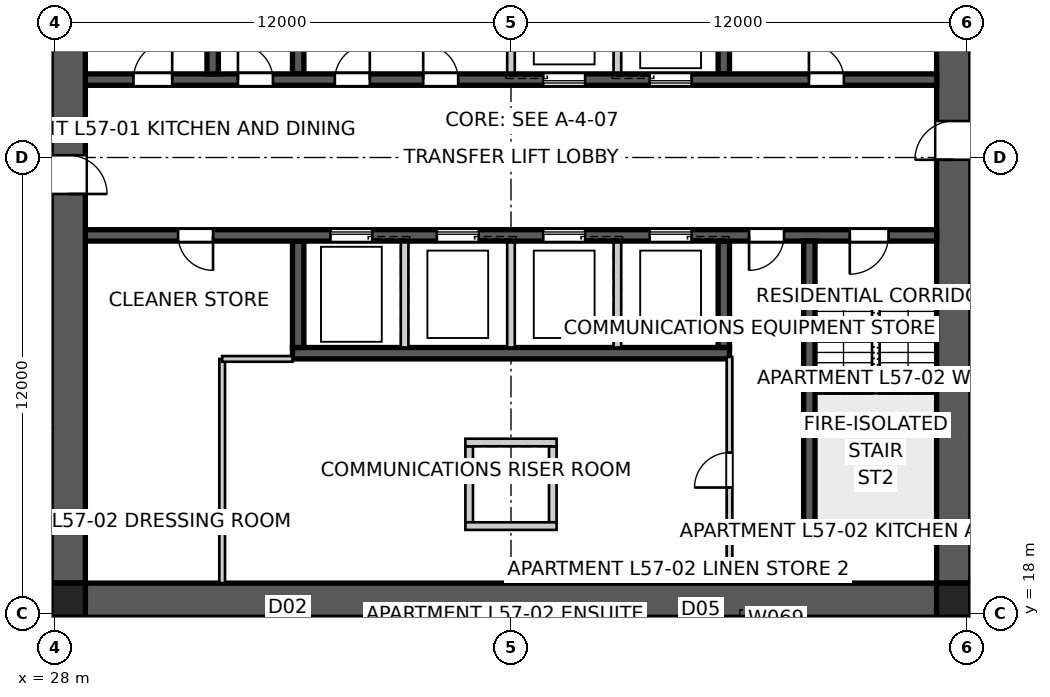
"""IFC4 building model, lengths in metres.
Left out: names, types, materials, properties, quantities, classifications, styles, units other than length and angle.
Written with IfcOpenShell. Run it as: python <this file> out.ifc"""

import sys

from ifc_helpers import new_model, si_unit, direction, frame, frame_2d, origin, origin_2d, place, context, subcontext, project, spatial, polyline, rectangle, outline, extrude, element, fill, save


model = new_model("IFC4")
c1 = context("Model", 3, precision=1e-05, world=origin(), true_north=direction((0.0, 1.0)))
c2 = subcontext(c1, "Body", "Model", "MODEL_VIEW")
j1 = project(units=[si_unit("LENGTHUNIT", "METRE"), si_unit("PLANEANGLEUNIT", "RADIAN")], contexts=[c1])
p1 = place(None, origin())
s1 = spatial("IfcSite", under=j1, at=p1, CompositionType="ELEMENT")
p2 = place(p1, origin())
s2 = spatial("IfcBuilding", under=s1, at=p2, CompositionType="ELEMENT")
p3 = place(p2, frame((0.0, 0.0, 208.2)))
s3 = spatial("IfcBuildingStorey", under=s2, at=p3, CompositionType="ELEMENT", Elevation=208.2)
p4 = place(p3, frame((51.2, 18.35, 0.0), z_axis=(0.0, 0.0, 1.0), x_axis=(-1.0, 0.0, 0.0)))
e1 = element("IfcWall", 1, at=p4, inside=s3, PredefinedType="SHEAR", context=c2, shape_type="SweptSolid", body=[
    extrude(outline(polyline([(0.0, -0.45), (22.4, -0.45), (22.4, -0.025), (22.85, -0.025), (22.85, 0.025), (22.4, 0.025), (22.4, 0.45), (0.0, 0.45), (0.0, 0.025), (-0.45, 0.025), (-0.45, -0.025), (0.0, -0.025), (0.0, -0.45)])), origin(), (0.0, 0.0, 1.0), 3.4),
])
p5 = place(p3, frame((51.65, 18.8, 0.0), z_axis=(0.0, 0.0, 1.0), x_axis=(0.0, 1.0, 0.0)))
e2 = element("IfcWall", 2, at=p5, inside=s3, PredefinedType="SHEAR", context=c2, shape_type="SweptSolid", body=[
    extrude(outline(polyline([(0.0, -0.45), (22.4, -0.45), (22.4, -0.025), (22.85, -0.025), (22.85, 0.025), (22.4, 0.025), (22.4, 0.45), (0.0, 0.45), (0.0, 0.025), (-0.45, 0.025), (-0.45, -0.025), (0.0, -0.025), (0.0, -0.45)])), origin(), (0.0, 0.0, 1.0), 3.4),
])
p6 = place(p5, frame((11.14, 0.0, 0.0)))
e3 = element("IfcOpeningElement", 3, at=p6, cuts=e2, PredefinedType="OPENING", context=c2, shape_type="SweptSolid", body=[
    extrude(rectangle(XDim=1.02, YDim=2.4, at=frame_2d((0.51, 1.2))), frame((0.0, 0.46, 0.0), z_axis=(0.0, -1.0, 0.0), x_axis=(1.0, 0.0, 0.0)), (0.0, 0.0, 1.0), 0.92),
])
p7 = place(p3, frame((28.35, 41.2, 0.0), z_axis=(0.0, 0.0, 1.0), x_axis=(0.0, -1.0, 0.0)))
e4 = element("IfcWall", 4, at=p7, inside=s3, PredefinedType="SHEAR", context=c2, shape_type="SweptSolid", body=[
    extrude(outline(polyline([(0.0, -0.45), (22.4, -0.45), (22.4, -0.025), (22.85, -0.025), (22.85, 0.025), (22.4, 0.025), (22.4, 0.45), (0.0, 0.45), (0.0, 0.025), (-0.45, 0.025), (-0.45, -0.025), (0.0, -0.025), (0.0, -0.45)])), origin(), (0.0, 0.0, 1.0), 3.4),
])
p8 = place(p7, frame((11.14, 0.0, 0.0)))
e5 = element("IfcOpeningElement", 5, at=p8, cuts=e4, PredefinedType="OPENING", context=c2, shape_type="SweptSolid", body=[
    extrude(rectangle(XDim=1.02, YDim=2.4, at=frame_2d((0.51, 1.2))), frame((0.0, 0.46, 0.0), z_axis=(0.0, -1.0, 0.0), x_axis=(1.0, 0.0, 0.0)), (0.0, 0.0, 1.0), 0.92),
])
p9 = place(p3, frame((28.8, 32.05, 0.0), z_axis=(0.0, 0.0, 1.0), x_axis=(1.0, 0.0, 0.0)))
e6 = element("IfcWall", 6, at=p9, inside=s3, PredefinedType="SHEAR", context=c2, shape_type="SweptSolid", body=[
    extrude(rectangle(XDim=22.4, YDim=0.3, at=frame_2d((11.2, 0.0))), origin(), (0.0, 0.0, 1.0), 3.4),
])
p10 = place(p9, frame((19.04, 0.0, 0.0)))
e7 = element("IfcOpeningElement", 7, at=p10, cuts=e6, PredefinedType="OPENING", context=c2, shape_type="SweptSolid", body=[
    extrude(rectangle(XDim=0.92, YDim=2.1, at=frame_2d((0.46, 1.05))), frame((0.0, 0.16, 0.0), z_axis=(0.0, -1.0, 0.0), x_axis=(1.0, 0.0, 0.0)), (0.0, 0.0, 1.0), 0.32),
])
p11 = place(p9, frame((1.265, 0.0, 0.0)))
e8 = element("IfcOpeningElement", 8, at=p11, cuts=e6, PredefinedType="OPENING", context=c2, shape_type="SweptSolid", body=[
    extrude(rectangle(XDim=1.02, YDim=2.1, at=frame_2d((0.51, 1.05))), frame((0.0, 0.16, 0.0), z_axis=(0.0, -1.0, 0.0), x_axis=(1.0, 0.0, 0.0)), (0.0, 0.0, 1.0), 0.32),
])
p12 = place(p9, frame((4.015, 0.0, 0.0)))
e9 = element("IfcOpeningElement", 9, at=p12, cuts=e6, PredefinedType="OPENING", context=c2, shape_type="SweptSolid", body=[
    extrude(rectangle(XDim=0.92, YDim=2.1, at=frame_2d((0.46, 1.05))), frame((0.0, 0.16, 0.0), z_axis=(0.0, -1.0, 0.0), x_axis=(1.0, 0.0, 0.0)), (0.0, 0.0, 1.0), 0.32),
])
p13 = place(p9, frame((6.565, 0.0, 0.0)))
e10 = element("IfcOpeningElement", 10, at=p13, cuts=e6, PredefinedType="OPENING", context=c2, shape_type="SweptSolid", body=[
    extrude(rectangle(XDim=0.92, YDim=2.1, at=frame_2d((0.46, 1.05))), frame((0.0, 0.16, 0.0), z_axis=(0.0, -1.0, 0.0), x_axis=(1.0, 0.0, 0.0)), (0.0, 0.0, 1.0), 0.32),
])
p14 = place(p9, frame((8.89, 0.0, 0.0)))
e11 = element("IfcOpeningElement", 11, at=p14, cuts=e6, PredefinedType="OPENING", context=c2, shape_type="SweptSolid", body=[
    extrude(rectangle(XDim=0.92, YDim=2.1, at=frame_2d((0.46, 1.05))), frame((0.0, 0.16, 0.0), z_axis=(0.0, -1.0, 0.0), x_axis=(1.0, 0.0, 0.0)), (0.0, 0.0, 1.0), 0.32),
])
p15 = place(p9, frame((12.05, 0.0, 0.0)))
e12 = element("IfcOpeningElement", 12, at=p15, cuts=e6, PredefinedType="OPENING", context=c2, shape_type="SweptSolid", body=[
    extrude(rectangle(XDim=1.1, YDim=2.1, at=frame_2d((0.55, 1.05))), frame((0.0, 0.16, 0.0), z_axis=(0.0, -1.0, 0.0), x_axis=(1.0, 0.0, 0.0)), (0.0, 0.0, 1.0), 0.32),
])
p16 = place(p9, frame((14.85, 0.0, 0.0)))
e13 = element("IfcOpeningElement", 13, at=p16, cuts=e6, PredefinedType="OPENING", context=c2, shape_type="SweptSolid", body=[
    extrude(rectangle(XDim=1.1, YDim=2.1, at=frame_2d((0.55, 1.05))), frame((0.0, 0.16, 0.0), z_axis=(0.0, -1.0, 0.0), x_axis=(1.0, 0.0, 0.0)), (0.0, 0.0, 1.0), 0.32),
])
p17 = place(p3, frame((51.2, 27.95, 0.0), z_axis=(0.0, 0.0, 1.0), x_axis=(-1.0, 0.0, 0.0)))
e14 = element("IfcWall", 14, at=p17, inside=s3, PredefinedType="SHEAR", context=c2, shape_type="SweptSolid", body=[
    extrude(rectangle(XDim=22.4, YDim=0.3, at=frame_2d((11.2, 0.0))), origin(), (0.0, 0.0, 1.0), 3.4),
])
p18 = place(p17, frame((19.04, 0.0, 0.0)))
e15 = element("IfcOpeningElement", 15, at=p18, cuts=e14, PredefinedType="OPENING", context=c2, shape_type="SweptSolid", body=[
    extrude(rectangle(XDim=0.92, YDim=2.1, at=frame_2d((0.46, 1.05))), frame((0.0, 0.16, 0.0), z_axis=(0.0, -1.0, 0.0), x_axis=(1.0, 0.0, 0.0)), (0.0, 0.0, 1.0), 0.32),
])
p19 = place(p17, frame((1.265, 0.0, 0.0)))
e16 = element("IfcOpeningElement", 16, at=p19, cuts=e14, PredefinedType="OPENING", context=c2, shape_type="SweptSolid", body=[
    extrude(rectangle(XDim=1.02, YDim=2.1, at=frame_2d((0.51, 1.05))), frame((0.0, 0.16, 0.0), z_axis=(0.0, -1.0, 0.0), x_axis=(1.0, 0.0, 0.0)), (0.0, 0.0, 1.0), 0.32),
])
p20 = place(p17, frame((4.015, 0.0, 0.0)))
e17 = element("IfcOpeningElement", 17, at=p20, cuts=e14, PredefinedType="OPENING", context=c2, shape_type="SweptSolid", body=[
    extrude(rectangle(XDim=0.92, YDim=2.1, at=frame_2d((0.46, 1.05))), frame((0.0, 0.16, 0.0), z_axis=(0.0, -1.0, 0.0), x_axis=(1.0, 0.0, 0.0)), (0.0, 0.0, 1.0), 0.32),
])
p21 = place(p17, frame((6.45, 0.0, 0.0)))
e18 = element("IfcOpeningElement", 18, at=p21, cuts=e14, PredefinedType="OPENING", context=c2, shape_type="SweptSolid", body=[
    extrude(rectangle(XDim=1.1, YDim=2.1, at=frame_2d((0.55, 1.05))), frame((0.0, 0.16, 0.0), z_axis=(0.0, -1.0, 0.0), x_axis=(1.0, 0.0, 0.0)), (0.0, 0.0, 1.0), 0.32),
])
p22 = place(p17, frame((9.25, 0.0, 0.0)))
e19 = element("IfcOpeningElement", 19, at=p22, cuts=e14, PredefinedType="OPENING", context=c2, shape_type="SweptSolid", body=[
    extrude(rectangle(XDim=1.1, YDim=2.1, at=frame_2d((0.55, 1.05))), frame((0.0, 0.16, 0.0), z_axis=(0.0, -1.0, 0.0), x_axis=(1.0, 0.0, 0.0)), (0.0, 0.0, 1.0), 0.32),
])
p23 = place(p17, frame((12.05, 0.0, 0.0)))
e20 = element("IfcOpeningElement", 20, at=p23, cuts=e14, PredefinedType="OPENING", context=c2, shape_type="SweptSolid", body=[
    extrude(rectangle(XDim=1.1, YDim=2.1, at=frame_2d((0.55, 1.05))), frame((0.0, 0.16, 0.0), z_axis=(0.0, -1.0, 0.0), x_axis=(1.0, 0.0, 0.0)), (0.0, 0.0, 1.0), 0.32),
])
p24 = place(p17, frame((14.85, 0.0, 0.0)))
e21 = element("IfcOpeningElement", 21, at=p24, cuts=e14, PredefinedType="OPENING", context=c2, shape_type="SweptSolid", body=[
    extrude(rectangle(XDim=1.1, YDim=2.1, at=frame_2d((0.55, 1.05))), frame((0.0, 0.16, 0.0), z_axis=(0.0, -1.0, 0.0), x_axis=(1.0, 0.0, 0.0)), (0.0, 0.0, 1.0), 0.32),
])
p25 = place(p3, frame((45.75, 24.85, 0.0), z_axis=(0.0, 0.0, 1.0), x_axis=(-1.0, 0.0, 0.0)))
e22 = element("IfcWall", 22, at=p25, inside=s3, PredefinedType="SHEAR", context=c2, shape_type="SweptSolid", body=[
    extrude(rectangle(XDim=11.5, YDim=0.3, at=frame_2d((5.75, 0.0))), origin(), (0.0, 0.0, 1.0), 3.4),
])
for number, where, z_axis, x_axis in (
    (23, (34.4, 32.2, 0.0), (0.0, 0.0, 1.0), (0.0, 1.0, 0.0)),
    (24, (45.6, 27.8, 0.0), (0.0, 0.0, 1.0), (0.0, -1.0, 0.0)),
):
    element("IfcWall", number, at=place(p3, frame(where, z_axis=z_axis, x_axis=x_axis)), inside=s3, PredefinedType="SHEAR", context=c2, shape_type="SweptSolid", body=[
        extrude(rectangle(XDim=2.8, YDim=0.3, at=frame_2d((1.4, 0.0))), origin(), (0.0, 0.0, 1.0), 3.4),
    ])
for number, where, z_axis, x_axis in (
    (25, (42.8, 27.8, 0.0), (0.0, 0.0, 1.0), (0.0, -1.0, 0.0)),
    (26, (40.0, 32.2, 0.0), (0.0, 0.0, 1.0), (0.0, 1.0, 0.0)),
    (27, (40.0, 27.8, 0.0), (0.0, 0.0, 1.0), (0.0, -1.0, 0.0)),
    (28, (42.8, 32.2, 0.0), (0.0, 0.0, 1.0), (0.0, 1.0, 0.0)),
    (29, (37.2, 27.8, 0.0), (0.0, 0.0, 1.0), (0.0, -1.0, 0.0)),
):
    element("IfcWall", number, at=place(p3, frame(where, z_axis=z_axis, x_axis=x_axis)), inside=s3, PredefinedType="SOLIDWALL", context=c2, shape_type="SweptSolid", body=[
        extrude(rectangle(XDim=2.8, YDim=0.2, at=frame_2d((1.4, 0.0))), origin(), (0.0, 0.0, 1.0), 3.4),
    ])
for number, where, z_axis, x_axis in (
    (30, (45.6, 32.2, 0.0), (0.0, 0.0, 1.0), (0.0, 1.0, 0.0)),
    (31, (34.4, 27.8, 0.0), (0.0, 0.0, 1.0), (0.0, -1.0, 0.0)),
):
    element("IfcWall", number, at=place(p3, frame(where, z_axis=z_axis, x_axis=x_axis)), inside=s3, PredefinedType="SHEAR", context=c2, shape_type="SweptSolid", body=[
        extrude(rectangle(XDim=2.8, YDim=0.3, at=frame_2d((1.4, 0.0))), origin(), (0.0, 0.0, 1.0), 3.4),
    ])
for number, where, z_axis, x_axis in (
    (32, (32.15, 32.2, 0.0), (0.0, 0.0, 1.0), (0.0, 1.0, 0.0)),
    (33, (47.85, 27.8, 0.0), (0.0, 0.0, 1.0), (0.0, -1.0, 0.0)),
):
    element("IfcWall", number, at=place(p3, frame(where, z_axis=z_axis, x_axis=x_axis)), inside=s3, PredefinedType="SHEAR", context=c2, shape_type="SweptSolid", body=[
        extrude(rectangle(XDim=7.7, YDim=0.3, at=frame_2d((3.85, 0.0))), origin(), (0.0, 0.0, 1.0), 3.4),
    ])
p26 = place(p3, frame((51.2, 20.25, 0.0), z_axis=(0.0, 0.0, 1.0), x_axis=(-1.0, 0.0, 0.0)))
e34 = element("IfcWall", 34, at=p26, inside=s3, PredefinedType="SHEAR", context=c2, shape_type="SweptSolid", body=[
    extrude(rectangle(XDim=3.5, YDim=0.3, at=frame_2d((1.75, 0.0))), origin(), (0.0, 0.0, 1.0), 3.4),
])
for number, where, z_axis, x_axis in (
    (35, (38.9, 22.4, 0.0), (0.0, 0.0, 1.0), (0.0, -1.0, 0.0)),
    (36, (41.1, 22.4, 0.0), (0.0, 0.0, 1.0), (0.0, -1.0, 0.0)),
):
    element("IfcWall", number, at=place(p3, frame(where, z_axis=z_axis, x_axis=x_axis)), inside=s3, PredefinedType="SOLIDWALL", context=c2, shape_type="SweptSolid", body=[
        extrude(rectangle(XDim=2.0, YDim=0.2, at=frame_2d((1.0, 0.0))), origin(), (0.0, 0.0, 1.0), 3.4),
    ])
for number, where, z_axis, x_axis in (
    (37, (38.8, 22.5, 0.0), (0.0, 0.0, 1.0), (1.0, 0.0, 0.0)),
    (38, (38.8, 20.3, 0.0), (0.0, 0.0, 1.0), (1.0, 0.0, 0.0)),
):
    element("IfcWall", number, at=place(p3, frame(where, z_axis=z_axis, x_axis=x_axis)), inside=s3, PredefinedType="SOLIDWALL", context=c2, shape_type="SweptSolid", body=[
        extrude(rectangle(XDim=2.4, YDim=0.2, at=frame_2d((1.2, 0.0))), origin(), (0.0, 0.0, 1.0), 3.4),
    ])
for number, where, z_axis, x_axis in (
    (39, (28.35, 18.35, 0.0), (0.0, 0.0, 1.0), (1.0, 0.0, 0.0)),
    (40, (51.65, 18.35, 0.0), (0.0, 0.0, 1.0), (1.0, 0.0, 0.0)),
):
    element("IfcColumn", number, at=place(p3, frame(where, z_axis=z_axis, x_axis=x_axis)), inside=s3, PredefinedType="COLUMN", context=c2, shape_type="SweptSolid", body=[
        extrude(rectangle(XDim=0.9, YDim=0.9, at=origin_2d()), origin(), (0.0, 0.0, 1.0), 3.4),
    ])
p27 = place(p3, frame((20.514, 18.75, 0.0), z_axis=(0.0, 0.0, 1.0), x_axis=(0.866020489494, 0.500008511703, 0.0)))
e41 = element("IfcWall", 41, at=p27, inside=s3, PredefinedType="PARTITIONING", context=c2, shape_type="SweptSolid", body=[
    extrude(rectangle(XDim=8.496, YDim=0.25, at=frame_2d((4.248, 0.0))), origin(), (0.0, 0.0, 1.0), 3.25),
])
p28 = place(p3, frame((45.75, 18.8, 0.0), z_axis=(0.0, 0.0, 1.0), x_axis=(0.0, 1.0, 0.0)))
e42 = element("IfcWall", 42, at=p28, inside=s3, PredefinedType="SOLIDWALL", context=c2, shape_type="SweptSolid", body=[
    extrude(rectangle(XDim=5.95, YDim=0.15, at=frame_2d((2.975, 0.0))), origin(), (0.0, 0.0, 1.0), 3.25),
])
p29 = place(p28, frame((2.515, 0.0, 0.0)))
e43 = element("IfcOpeningElement", 43, at=p29, cuts=e42, PredefinedType="OPENING", context=c2, shape_type="SweptSolid", body=[
    extrude(rectangle(XDim=0.92, YDim=2.1, at=frame_2d((0.46, 1.05))), frame((0.0, 0.085, 0.0), z_axis=(0.0, -1.0, 0.0), x_axis=(1.0, 0.0, 0.0)), (0.0, 0.0, 1.0), 0.17),
])
p30 = place(p3, frame((32.4, 18.8, 0.0), z_axis=(0.0, 0.0, 1.0), x_axis=(0.0, 1.0, 0.0)))
e44 = element("IfcWall", 44, at=p30, inside=s3, PredefinedType="SOLIDWALL", context=c2, shape_type="SweptSolid", body=[
    extrude(rectangle(XDim=5.9, YDim=0.15, at=frame_2d((2.95, 0.0))), origin(), (0.0, 0.0, 1.0), 3.25),
])
p31 = place(p3, frame((32.4, 24.7, 0.0), z_axis=(0.0, 0.0, 1.0), x_axis=(1.0, 0.0, 0.0)))
e45 = element("IfcWall", 45, at=p31, inside=s3, PredefinedType="SOLIDWALL", context=c2, shape_type="SweptSolid", body=[
    extrude(rectangle(XDim=1.85, YDim=0.15, at=frame_2d((0.925, 0.0))), origin(), (0.0, 0.0, 1.0), 3.25),
])
p32 = place(p3, frame((52.1, 22.766, 0.0), z_axis=(0.0, 0.0, 1.0), x_axis=(0.830477359488, -0.55705238118, 0.0)))
e46 = element("IfcWall", 46, at=p32, inside=s3, PredefinedType="PARTITIONING", context=c2, shape_type="SweptSolid", body=[
    extrude(rectangle(XDim=0.359, YDim=0.12, at=frame_2d((0.179, 0.0))), origin(), (0.0, 0.0, 1.0), 3.25),
])
p33 = place(p10, origin())
e47 = element("IfcDoor", 47, at=p33, inside=s3, OperationType="SINGLE_SWING_LEFT", PredefinedType="DOOR", context=c2, shape_type="SweptSolid", body=[
    extrude(rectangle(XDim=0.92, YDim=2.1, at=frame_2d((0.46, 1.05))), frame((0.0, 0.025, 0.0), z_axis=(0.0, -1.0, 0.0), x_axis=(1.0, 0.0, 0.0)), (0.0, 0.0, 1.0), 0.05),
])
fill(e7, e47)
p34 = place(p18, origin())
e48 = element("IfcDoor", 48, at=p34, inside=s3, OperationType="SINGLE_SWING_LEFT", PredefinedType="DOOR", context=c2, shape_type="SweptSolid", body=[
    extrude(rectangle(XDim=0.92, YDim=2.1, at=frame_2d((0.46, 1.05))), frame((0.0, 0.025, 0.0), z_axis=(0.0, -1.0, 0.0), x_axis=(1.0, 0.0, 0.0)), (0.0, 0.0, 1.0), 0.05),
])
fill(e15, e48)
p35 = place(p19, origin())
e49 = element("IfcDoor", 49, at=p35, inside=s3, OperationType="SINGLE_SWING_RIGHT", PredefinedType="DOOR", context=c2, shape_type="SweptSolid", body=[
    extrude(rectangle(XDim=1.02, YDim=2.1, at=frame_2d((0.51, 1.05))), frame((0.0, 0.025, 0.0), z_axis=(0.0, -1.0, 0.0), x_axis=(1.0, 0.0, 0.0)), (0.0, 0.0, 1.0), 0.05),
])
fill(e16, e49)
p36 = place(p11, origin())
e50 = element("IfcDoor", 50, at=p36, inside=s3, OperationType="SINGLE_SWING_RIGHT", PredefinedType="DOOR", context=c2, shape_type="SweptSolid", body=[
    extrude(rectangle(XDim=1.02, YDim=2.1, at=frame_2d((0.51, 1.05))), frame((0.0, 0.025, 0.0), z_axis=(0.0, -1.0, 0.0), x_axis=(1.0, 0.0, 0.0)), (0.0, 0.0, 1.0), 0.05),
])
fill(e8, e50)
p37 = place(p12, origin())
e51 = element("IfcDoor", 51, at=p37, inside=s3, OperationType="SINGLE_SWING_LEFT", PredefinedType="DOOR", context=c2, shape_type="SweptSolid", body=[
    extrude(rectangle(XDim=0.92, YDim=2.1, at=frame_2d((0.46, 1.05))), frame((0.0, 0.025, 0.0), z_axis=(0.0, -1.0, 0.0), x_axis=(1.0, 0.0, 0.0)), (0.0, 0.0, 1.0), 0.05),
])
fill(e9, e51)
p38 = place(p20, origin())
e52 = element("IfcDoor", 52, at=p38, inside=s3, OperationType="SINGLE_SWING_RIGHT", PredefinedType="DOOR", context=c2, shape_type="SweptSolid", body=[
    extrude(rectangle(XDim=0.92, YDim=2.1, at=frame_2d((0.46, 1.05))), frame((0.0, 0.025, 0.0), z_axis=(0.0, -1.0, 0.0), x_axis=(1.0, 0.0, 0.0)), (0.0, 0.0, 1.0), 0.05),
])
fill(e17, e52)
p39 = place(p29, origin())
e53 = element("IfcDoor", 53, at=p39, inside=s3, OperationType="SINGLE_SWING_LEFT", PredefinedType="DOOR", context=c2, shape_type="SweptSolid", body=[
    extrude(rectangle(XDim=0.92, YDim=2.1, at=frame_2d((0.46, 1.05))), frame((0.0, 0.025, 0.0), z_axis=(0.0, -1.0, 0.0), x_axis=(1.0, 0.0, 0.0)), (0.0, 0.0, 1.0), 0.05),
])
fill(e43, e53)
p40 = place(p13, origin())
e54 = element("IfcDoor", 54, at=p40, inside=s3, OperationType="SINGLE_SWING_RIGHT", PredefinedType="DOOR", context=c2, shape_type="SweptSolid", body=[
    extrude(rectangle(XDim=0.92, YDim=2.1, at=frame_2d((0.46, 1.05))), frame((0.0, 0.025, 0.0), z_axis=(0.0, -1.0, 0.0), x_axis=(1.0, 0.0, 0.0)), (0.0, 0.0, 1.0), 0.05),
])
fill(e10, e54)
p41 = place(p14, origin())
e55 = element("IfcDoor", 55, at=p41, inside=s3, OperationType="SINGLE_SWING_LEFT", PredefinedType="DOOR", context=c2, shape_type="SweptSolid", body=[
    extrude(rectangle(XDim=0.92, YDim=2.1, at=frame_2d((0.46, 1.05))), frame((0.0, 0.025, 0.0), z_axis=(0.0, -1.0, 0.0), x_axis=(1.0, 0.0, 0.0)), (0.0, 0.0, 1.0), 0.05),
])
fill(e11, e55)
p42 = place(p6, origin())
e56 = element("IfcDoor", 56, at=p42, inside=s3, OperationType="SINGLE_SWING_LEFT", PredefinedType="DOOR", context=c2, shape_type="SweptSolid", body=[
    extrude(rectangle(XDim=1.02, YDim=2.4, at=frame_2d((0.51, 1.2))), frame((0.0, 0.025, 0.0), z_axis=(0.0, -1.0, 0.0), x_axis=(1.0, 0.0, 0.0)), (0.0, 0.0, 1.0), 0.05),
])
fill(e3, e56)
p43 = place(p8, origin())
e57 = element("IfcDoor", 57, at=p43, inside=s3, OperationType="SINGLE_SWING_RIGHT", PredefinedType="DOOR", context=c2, shape_type="SweptSolid", body=[
    extrude(rectangle(XDim=1.02, YDim=2.4, at=frame_2d((0.51, 1.2))), frame((0.0, 0.025, 0.0), z_axis=(0.0, -1.0, 0.0), x_axis=(1.0, 0.0, 0.0)), (0.0, 0.0, 1.0), 0.05),
])
fill(e5, e57)
p44 = place(p21, origin())
e58 = element("IfcDoor", 58, at=p44, inside=s3, OperationType="SLIDING_TO_LEFT", PredefinedType="DOOR", context=c2, shape_type="SweptSolid", body=[
    extrude(rectangle(XDim=1.1, YDim=2.1, at=frame_2d((0.55, 1.05))), frame((0.0, 0.025, 0.0), z_axis=(0.0, -1.0, 0.0), x_axis=(1.0, 0.0, 0.0)), (0.0, 0.0, 1.0), 0.05),
])
fill(e18, e58)
p45 = place(p22, origin())
e59 = element("IfcDoor", 59, at=p45, inside=s3, OperationType="SLIDING_TO_LEFT", PredefinedType="DOOR", context=c2, shape_type="SweptSolid", body=[
    extrude(rectangle(XDim=1.1, YDim=2.1, at=frame_2d((0.55, 1.05))), frame((0.0, 0.025, 0.0), z_axis=(0.0, -1.0, 0.0), x_axis=(1.0, 0.0, 0.0)), (0.0, 0.0, 1.0), 0.05),
])
fill(e19, e59)
p46 = place(p15, origin())
e60 = element("IfcDoor", 60, at=p46, inside=s3, OperationType="SLIDING_TO_LEFT", PredefinedType="DOOR", context=c2, shape_type="SweptSolid", body=[
    extrude(rectangle(XDim=1.1, YDim=2.1, at=frame_2d((0.55, 1.05))), frame((0.0, 0.025, 0.0), z_axis=(0.0, -1.0, 0.0), x_axis=(1.0, 0.0, 0.0)), (0.0, 0.0, 1.0), 0.05),
])
fill(e12, e60)
p47 = place(p23, origin())
e61 = element("IfcDoor", 61, at=p47, inside=s3, OperationType="SLIDING_TO_LEFT", PredefinedType="DOOR", context=c2, shape_type="SweptSolid", body=[
    extrude(rectangle(XDim=1.1, YDim=2.1, at=frame_2d((0.55, 1.05))), frame((0.0, 0.025, 0.0), z_axis=(0.0, -1.0, 0.0), x_axis=(1.0, 0.0, 0.0)), (0.0, 0.0, 1.0), 0.05),
])
fill(e20, e61)
p48 = place(p16, origin())
e62 = element("IfcDoor", 62, at=p48, inside=s3, OperationType="SLIDING_TO_LEFT", PredefinedType="DOOR", context=c2, shape_type="SweptSolid", body=[
    extrude(rectangle(XDim=1.1, YDim=2.1, at=frame_2d((0.55, 1.05))), frame((0.0, 0.025, 0.0), z_axis=(0.0, -1.0, 0.0), x_axis=(1.0, 0.0, 0.0)), (0.0, 0.0, 1.0), 0.05),
])
fill(e13, e62)
p49 = place(p24, origin())
e63 = element("IfcDoor", 63, at=p49, inside=s3, OperationType="SLIDING_TO_LEFT", PredefinedType="DOOR", context=c2, shape_type="SweptSolid", body=[
    extrude(rectangle(XDim=1.1, YDim=2.1, at=frame_2d((0.55, 1.05))), frame((0.0, 0.025, 0.0), z_axis=(0.0, -1.0, 0.0), x_axis=(1.0, 0.0, 0.0)), (0.0, 0.0, 1.0), 0.05),
])
fill(e21, e63)
save(model, sys.argv[1])
